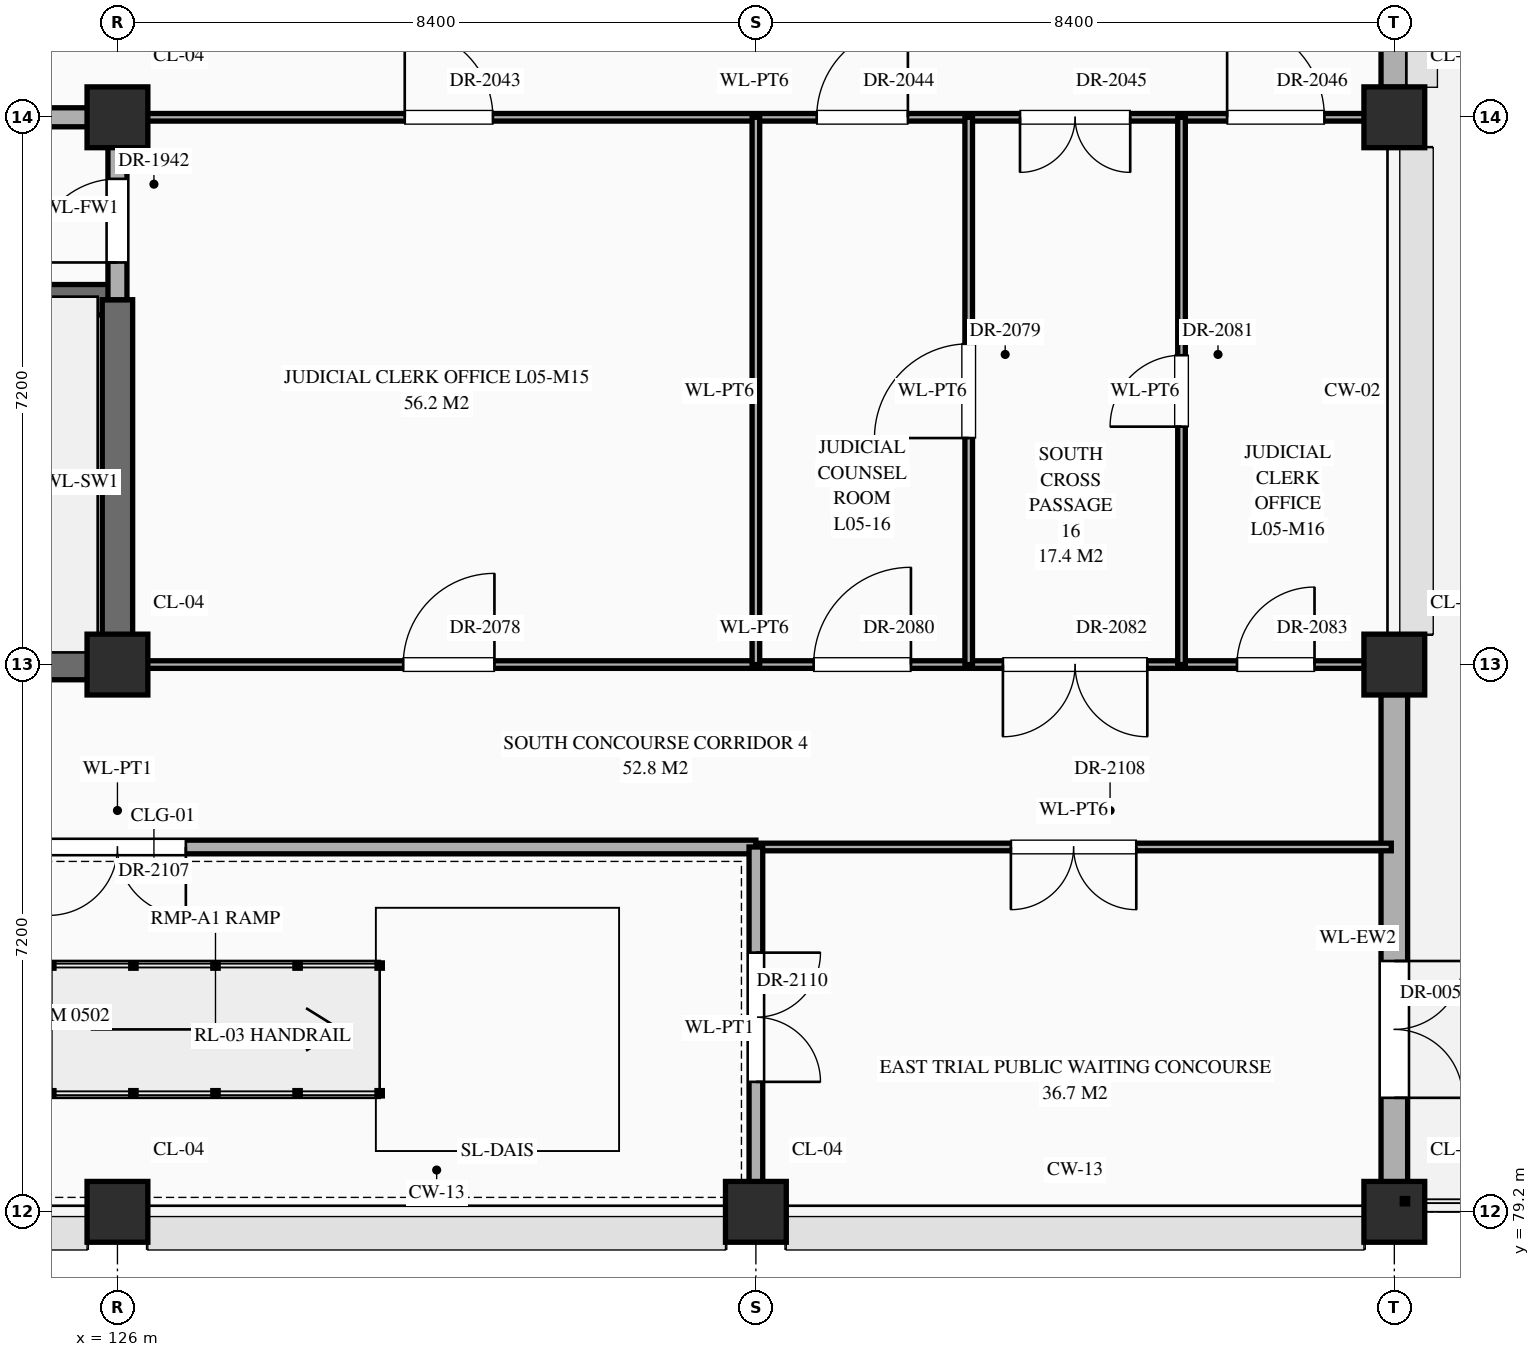
"""IFC4 building model, lengths in metres.
Left out: names, types, materials, properties, quantities, classifications, styles, units other than length and angle.
Written with IfcOpenShell. Run it as: python <this file> out.ifc"""

import sys

from ifc_helpers import new_model, si_unit, direction, frame, frame_2d, origin, origin_2d, place, context, subcontext, project, spatial, rectangle, extrude, element, fill, save


model = new_model("IFC4")
c1 = context("Model", 3, precision=1e-05, world=origin(), true_north=direction((0.0, 1.0)))
c2 = subcontext(c1, "Body", "Model", "MODEL_VIEW")
j1 = project(units=[si_unit("LENGTHUNIT", "METRE"), si_unit("PLANEANGLEUNIT", "RADIAN")], contexts=[c1])
p1 = place(None, origin())
s1 = spatial("IfcSite", under=j1, at=p1, CompositionType="ELEMENT")
p2 = place(p1, origin())
s2 = spatial("IfcBuilding", under=s1, at=p2, CompositionType="ELEMENT")
p3 = place(p2, frame((0.0, 0.0, 21.6)))
s3 = spatial("IfcBuildingStorey", under=s2, at=p3, CompositionType="ELEMENT", Elevation=21.6)
for number, where, z_axis, x_axis in (
    (1, (126.0, 79.2, 0.0), (0.0, 0.0, 1.0), (1.0, 0.0, 0.0)),
    (2, (126.0, 86.4, 0.0), (0.0, 0.0, 1.0), (1.0, 0.0, 0.0)),
    (3, (126.0, 93.6, 0.0), (0.0, 0.0, 1.0), (1.0, 0.0, 0.0)),
    (4, (134.4, 79.2, 0.0), (0.0, 0.0, 1.0), (1.0, 0.0, 0.0)),
    (5, (142.8, 79.2, 0.0), (0.0, 0.0, 1.0), (1.0, 0.0, 0.0)),
    (6, (142.8, 86.4, 0.0), (0.0, 0.0, 1.0), (1.0, 0.0, 0.0)),
    (7, (142.8, 93.6, 0.0), (0.0, 0.0, 1.0), (1.0, 0.0, 0.0)),
):
    element("IfcColumn", number, at=place(p3, frame(where, z_axis=z_axis, x_axis=x_axis)), inside=s3, PredefinedType="COLUMN", context=c2, shape_type="SweptSolid", body=[
        extrude(rectangle(XDim=0.8, YDim=0.8, at=origin_2d()), origin(), (0.0, 0.0, 1.0), 4.5),
    ])
p4 = place(p3, frame((142.8, 79.595, 0.0), z_axis=(0.0, 0.0, 1.0), x_axis=(0.0, 1.0, 0.0)))
e8 = element("IfcWall", 8, at=p4, inside=s3, PredefinedType="STANDARD", context=c2, shape_type="SweptSolid", body=[
    extrude(rectangle(XDim=6.41, YDim=0.35, at=frame_2d((3.205, 0.0))), origin(), (0.0, 0.0, 1.0), 3.59),
])
p5 = place(p4, frame((1.105, 0.0, 0.0)))
e9 = element("IfcOpeningElement", 9, at=p5, cuts=e8, PredefinedType="OPENING", context=c2, shape_type="SweptSolid", body=[
    extrude(rectangle(XDim=1.8, YDim=2.25, at=frame_2d((0.9, 1.125))), frame((0.0, 0.187, 0.0), z_axis=(0.0, -1.0, 0.0), x_axis=(1.0, 0.0, 0.0)), (0.0, 0.0, 1.0), 0.374),
])
p6 = place(p3, frame((142.8, 93.995, 0.0), z_axis=(0.0, 0.0, 1.0), x_axis=(0.0, 1.0, 0.0)))
e10 = element("IfcWall", 10, at=p6, inside=s3, PredefinedType="STANDARD", context=c2, shape_type="SweptSolid", body=[
    extrude(rectangle(XDim=6.41, YDim=0.35, at=frame_2d((3.205, 0.0))), origin(), (0.0, 0.0, 1.0), 3.59),
])
p7 = place(p6, frame((3.73, 0.0, 0.85)))
e11 = element("IfcOpeningElement", 11, at=p7, cuts=e10, PredefinedType="OPENING", context=c2, shape_type="SweptSolid", body=[
    extrude(rectangle(XDim=1.55, YDim=1.38, at=frame_2d((0.775, 0.69))), frame((0.0, 0.187, 0.0), z_axis=(0.0, -1.0, 0.0), x_axis=(1.0, 0.0, 0.0)), (0.0, 0.0, 1.0), 0.374),
])
p8 = place(p3, frame((117.6, 84.0, 0.0), z_axis=(0.0, 0.0, 1.0), x_axis=(1.0, 0.0, 0.0)))
e12 = element("IfcWall", 12, at=p8, inside=s3, PredefinedType="STANDARD", context=c2, shape_type="SweptSolid", body=[
    extrude(rectangle(XDim=16.8, YDim=0.18, at=frame_2d((8.4, 0.0))), origin(), (0.0, 0.0, 1.0), 4.24),
])
p9 = place(p8, frame((7.5, 0.0, 0.0)))
e13 = element("IfcOpeningElement", 13, at=p9, cuts=e12, PredefinedType="OPENING", context=c2, shape_type="SweptSolid", body=[
    extrude(rectangle(XDim=1.8, YDim=2.5, at=frame_2d((0.9, 1.25))), frame((0.0, 0.102, 0.0), z_axis=(0.0, -1.0, 0.0), x_axis=(1.0, 0.0, 0.0)), (0.0, 0.0, 1.0), 0.204),
])
p10 = place(p3, frame((134.4, 84.0, 0.0), z_axis=(0.0, 0.0, 1.0), x_axis=(1.0, 0.0, 0.0)))
e14 = element("IfcWall", 14, at=p10, inside=s3, PredefinedType="STANDARD", context=c2, shape_type="SweptSolid", body=[
    extrude(rectangle(XDim=8.36, YDim=0.1, at=frame_2d((4.18, 0.0))), origin(), (0.0, 0.0, 1.0), 4.24),
])
p11 = place(p10, frame((3.355, 0.0, 0.0)))
e15 = element("IfcOpeningElement", 15, at=p11, cuts=e14, PredefinedType="OPENING", context=c2, shape_type="SweptSolid", body=[
    extrude(rectangle(XDim=1.65, YDim=2.4, at=frame_2d((0.825, 1.2))), frame((0.0, 0.062, 0.0), z_axis=(0.0, -1.0, 0.0), x_axis=(1.0, 0.0, 0.0)), (0.0, 0.0, 1.0), 0.124),
])
p12 = place(p3, frame((117.6, 86.4, 0.0), z_axis=(0.0, 0.0, 1.0), x_axis=(1.0, 0.0, 0.0)))
e16 = element("IfcWall", 16, at=p12, inside=s3, PredefinedType="SHEAR", context=c2, shape_type="SweptSolid", body=[
    extrude(rectangle(XDim=8.4, YDim=0.4, at=frame_2d((4.2, 0.0))), origin(), (0.0, 0.0, 1.0), 4.24),
])
p13 = place(p3, frame((126.0, 86.4, 0.0), z_axis=(0.0, 0.0, 1.0), x_axis=(1.0, 0.0, 0.0)))
e17 = element("IfcWall", 17, at=p13, inside=s3, PredefinedType="STANDARD", context=c2, shape_type="SweptSolid", body=[
    extrude(rectangle(XDim=16.76, YDim=0.1, at=frame_2d((8.38, 0.0))), origin(), (0.0, 0.0, 1.0), 3.19),
])
p14 = place(p13, frame((3.76, 0.0, 0.0)))
e18 = element("IfcOpeningElement", 18, at=p14, cuts=e17, PredefinedType="OPENING", context=c2, shape_type="SweptSolid", body=[
    extrude(rectangle(XDim=1.2, YDim=2.35, at=frame_2d((0.6, 1.175))), frame((0.0, 0.062, 0.0), z_axis=(0.0, -1.0, 0.0), x_axis=(1.0, 0.0, 0.0)), (0.0, 0.0, 1.0), 0.124),
])
p15 = place(p13, frame((9.16, 0.0, 0.0)))
e19 = element("IfcOpeningElement", 19, at=p15, cuts=e17, PredefinedType="OPENING", context=c2, shape_type="SweptSolid", body=[
    extrude(rectangle(XDim=1.28, YDim=2.35, at=frame_2d((0.64, 1.175))), frame((0.0, 0.062, 0.0), z_axis=(0.0, -1.0, 0.0), x_axis=(1.0, 0.0, 0.0)), (0.0, 0.0, 1.0), 0.124),
])
p16 = place(p13, frame((11.65, 0.0, 0.0)))
e20 = element("IfcOpeningElement", 20, at=p16, cuts=e17, PredefinedType="OPENING", context=c2, shape_type="SweptSolid", body=[
    extrude(rectangle(XDim=1.9, YDim=2.5, at=frame_2d((0.95, 1.25))), frame((0.0, 0.062, 0.0), z_axis=(0.0, -1.0, 0.0), x_axis=(1.0, 0.0, 0.0)), (0.0, 0.0, 1.0), 0.124),
])
p17 = place(p13, frame((14.73, 0.0, 0.0)))
e21 = element("IfcOpeningElement", 21, at=p17, cuts=e17, PredefinedType="OPENING", context=c2, shape_type="SweptSolid", body=[
    extrude(rectangle(XDim=1.02, YDim=2.4, at=frame_2d((0.51, 1.2))), frame((0.0, 0.062, 0.0), z_axis=(0.0, -1.0, 0.0), x_axis=(1.0, 0.0, 0.0)), (0.0, 0.0, 1.0), 0.124),
])
p18 = place(p3, frame((117.6, 91.2, 0.0), z_axis=(0.0, 0.0, 1.0), x_axis=(1.0, 0.0, 0.0)))
e22 = element("IfcWall", 22, at=p18, inside=s3, PredefinedType="SHEAR", context=c2, shape_type="SweptSolid", body=[
    extrude(rectangle(XDim=8.4, YDim=0.4, at=frame_2d((4.2, 0.0))), origin(), (0.0, 0.0, 1.0), 4.24),
])
p19 = place(p18, frame((0.65, 0.0, 0.0)))
e23 = element("IfcOpeningElement", 23, at=p19, cuts=e22, PredefinedType="OPENING", context=c2, shape_type="SweptSolid", body=[
    extrude(rectangle(XDim=1.1, YDim=2.2, at=frame_2d((0.55, 1.1))), frame((0.0, 0.212, 0.0), z_axis=(0.0, -1.0, 0.0), x_axis=(1.0, 0.0, 0.0)), (0.0, 0.0, 1.0), 0.424),
])
p20 = place(p3, frame((117.6, 93.6, 0.0), z_axis=(0.0, 0.0, 1.0), x_axis=(1.0, 0.0, 0.0)))
e24 = element("IfcWall", 24, at=p20, inside=s3, PredefinedType="STANDARD", context=c2, shape_type="SweptSolid", body=[
    extrude(rectangle(XDim=8.4, YDim=0.25, at=frame_2d((4.2, 0.0))), origin(), (0.0, 0.0, 1.0), 3.39),
])
p21 = place(p20, frame((3.3, 0.0, 0.0)))
e25 = element("IfcOpeningElement", 25, at=p21, cuts=e24, PredefinedType="OPENING", context=c2, shape_type="SweptSolid", body=[
    extrude(rectangle(XDim=1.8, YDim=2.35, at=frame_2d((0.9, 1.175))), frame((0.0, 0.137, 0.0), z_axis=(0.0, -1.0, 0.0), x_axis=(1.0, 0.0, 0.0)), (0.0, 0.0, 1.0), 0.274),
])
p22 = place(p3, frame((126.0, 93.6, 0.0), z_axis=(0.0, 0.0, 1.0), x_axis=(1.0, 0.0, 0.0)))
e26 = element("IfcWall", 26, at=p22, inside=s3, PredefinedType="STANDARD", context=c2, shape_type="SweptSolid", body=[
    extrude(rectangle(XDim=16.76, YDim=0.1, at=frame_2d((8.38, 0.0))), origin(), (0.0, 0.0, 1.0), 3.19),
])
p23 = place(p22, frame((3.78, 0.0, 0.0)))
e27 = element("IfcOpeningElement", 27, at=p23, cuts=e26, PredefinedType="OPENING", context=c2, shape_type="SweptSolid", body=[
    extrude(rectangle(XDim=1.16, YDim=2.3, at=frame_2d((0.58, 1.15))), frame((0.0, 0.062, 0.0), z_axis=(0.0, -1.0, 0.0), x_axis=(1.0, 0.0, 0.0)), (0.0, 0.0, 1.0), 0.124),
])
p24 = place(p22, frame((9.2, 0.0, 0.0)))
e28 = element("IfcOpeningElement", 28, at=p24, cuts=e26, PredefinedType="OPENING", context=c2, shape_type="SweptSolid", body=[
    extrude(rectangle(XDim=1.2, YDim=2.35, at=frame_2d((0.6, 1.175))), frame((0.0, 0.062, 0.0), z_axis=(0.0, -1.0, 0.0), x_axis=(1.0, 0.0, 0.0)), (0.0, 0.0, 1.0), 0.124),
])
p25 = place(p22, frame((11.875, 0.0, 0.0)))
e29 = element("IfcOpeningElement", 29, at=p25, cuts=e26, PredefinedType="OPENING", context=c2, shape_type="SweptSolid", body=[
    extrude(rectangle(XDim=1.45, YDim=2.3, at=frame_2d((0.725, 1.15))), frame((0.0, 0.062, 0.0), z_axis=(0.0, -1.0, 0.0), x_axis=(1.0, 0.0, 0.0)), (0.0, 0.0, 1.0), 0.124),
])
p26 = place(p22, frame((14.6, 0.0, 0.0)))
e30 = element("IfcOpeningElement", 30, at=p26, cuts=e26, PredefinedType="OPENING", context=c2, shape_type="SweptSolid", body=[
    extrude(rectangle(XDim=1.28, YDim=2.35, at=frame_2d((0.64, 1.175))), frame((0.0, 0.062, 0.0), z_axis=(0.0, -1.0, 0.0), x_axis=(1.0, 0.0, 0.0)), (0.0, 0.0, 1.0), 0.124),
])
p27 = place(p3, frame((126.0, 86.4, 0.0), z_axis=(0.0, 0.0, 1.0), x_axis=(0.0, 1.0, 0.0)))
e31 = element("IfcWall", 31, at=p27, inside=s3, PredefinedType="SHEAR", context=c2, shape_type="SweptSolid", body=[
    extrude(rectangle(XDim=4.8, YDim=0.4, at=frame_2d((2.4, 0.0))), origin(), (0.0, 0.0, 1.0), 4.24),
])
p28 = place(p3, frame((126.0, 91.2, 0.0), z_axis=(0.0, 0.0, 1.0), x_axis=(0.0, 1.0, 0.0)))
e32 = element("IfcWall", 32, at=p28, inside=s3, PredefinedType="STANDARD", context=c2, shape_type="SweptSolid", body=[
    extrude(rectangle(XDim=2.4, YDim=0.25, at=frame_2d((1.2, 0.0))), origin(), (0.0, 0.0, 1.0), 3.49),
])
p29 = place(p28, frame((0.49, 0.0, 0.0)))
e33 = element("IfcOpeningElement", 33, at=p29, cuts=e32, PredefinedType="OPENING", context=c2, shape_type="SweptSolid", body=[
    extrude(rectangle(XDim=1.1, YDim=2.2, at=frame_2d((0.55, 1.1))), frame((0.0, 0.137, 0.0), z_axis=(0.0, -1.0, 0.0), x_axis=(1.0, 0.0, 0.0)), (0.0, 0.0, 1.0), 0.274),
])
p30 = place(p3, frame((134.4, 79.24, 0.0), z_axis=(0.0, 0.0, 1.0), x_axis=(0.0, 1.0, 0.0)))
e34 = element("IfcWall", 34, at=p30, inside=s3, PredefinedType="STANDARD", context=c2, shape_type="SweptSolid", body=[
    extrude(rectangle(XDim=4.76, YDim=0.18, at=frame_2d((2.38, 0.0))), origin(), (0.0, 0.0, 1.0), 4.24),
])
p31 = place(p30, frame((1.67, 0.0, 0.0)))
e35 = element("IfcOpeningElement", 35, at=p31, cuts=e34, PredefinedType="OPENING", context=c2, shape_type="SweptSolid", body=[
    extrude(rectangle(XDim=1.7, YDim=2.45, at=frame_2d((0.85, 1.225))), frame((0.0, 0.102, 0.0), z_axis=(0.0, -1.0, 0.0), x_axis=(1.0, 0.0, 0.0)), (0.0, 0.0, 1.0), 0.204),
])
p32 = place(p3, frame((134.4, 86.4, 0.0), z_axis=(0.0, 0.0, 1.0), x_axis=(0.0, 1.0, 0.0)))
e36 = element("IfcWall", 36, at=p32, inside=s3, PredefinedType="STANDARD", context=c2, shape_type="SweptSolid", body=[
    extrude(rectangle(XDim=7.2, YDim=0.1, at=frame_2d((3.6, 0.0))), origin(), (0.0, 0.0, 1.0), 4.24),
])
p33 = place(p3, frame((137.2, 86.4, 0.0), z_axis=(0.0, 0.0, 1.0), x_axis=(0.0, 1.0, 0.0)))
e37 = element("IfcWall", 37, at=p33, inside=s3, PredefinedType="STANDARD", context=c2, shape_type="SweptSolid", body=[
    extrude(rectangle(XDim=7.2, YDim=0.1, at=frame_2d((3.6, 0.0))), origin(), (0.0, 0.0, 1.0), 4.24),
])
p34 = place(p33, frame((2.98, 0.0, 0.0)))
e38 = element("IfcOpeningElement", 38, at=p34, cuts=e37, PredefinedType="OPENING", context=c2, shape_type="SweptSolid", body=[
    extrude(rectangle(XDim=1.24, YDim=2.3, at=frame_2d((0.62, 1.15))), frame((0.0, 0.062, 0.0), z_axis=(0.0, -1.0, 0.0), x_axis=(1.0, 0.0, 0.0)), (0.0, 0.0, 1.0), 0.124),
])
p35 = place(p3, frame((140.0, 86.4, 0.0), z_axis=(0.0, 0.0, 1.0), x_axis=(0.0, 1.0, 0.0)))
e39 = element("IfcWall", 39, at=p35, inside=s3, PredefinedType="STANDARD", context=c2, shape_type="SweptSolid", body=[
    extrude(rectangle(XDim=7.2, YDim=0.1, at=frame_2d((3.6, 0.0))), origin(), (0.0, 0.0, 1.0), 4.24),
])
p36 = place(p35, frame((3.13, 0.0, 0.0)))
e40 = element("IfcOpeningElement", 40, at=p36, cuts=e39, PredefinedType="OPENING", context=c2, shape_type="SweptSolid", body=[
    extrude(rectangle(XDim=0.94, YDim=2.3, at=frame_2d((0.47, 1.15))), frame((0.0, 0.062, 0.0), z_axis=(0.0, -1.0, 0.0), x_axis=(1.0, 0.0, 0.0)), (0.0, 0.0, 1.0), 0.124),
])
p37 = place(p5, frame((1.8, 0.0, 0.0), z_axis=(0.0, 0.0, 1.0), x_axis=(-1.0, 0.0, 0.0)))
e41 = element("IfcDoor", 41, at=p37, inside=s3, OperationType="DOUBLE_DOOR_SINGLE_SWING", PredefinedType="DOOR", context=c2, shape_type="SweptSolid", body=[
    extrude(rectangle(XDim=1.8, YDim=2.25, at=frame_2d((0.9, 1.125))), frame((0.0, 0.025, 0.0), z_axis=(0.0, -1.0, 0.0), x_axis=(1.0, 0.0, 0.0)), (0.0, 0.0, 1.0), 0.05),
])
fill(e9, e41)
p38 = place(p29, origin())
e42 = element("IfcDoor", 42, at=p38, inside=s3, OperationType="SINGLE_SWING_LEFT", PredefinedType="DOOR", context=c2, shape_type="SweptSolid", body=[
    extrude(rectangle(XDim=1.1, YDim=2.2, at=frame_2d((0.55, 1.1))), frame((0.0, 0.025, 0.0), z_axis=(0.0, -1.0, 0.0), x_axis=(1.0, 0.0, 0.0)), (0.0, 0.0, 1.0), 0.05),
])
fill(e33, e42)
p39 = place(p23, origin())
e43 = element("IfcDoor", 43, at=p39, inside=s3, OperationType="SINGLE_SWING_LEFT", PredefinedType="DOOR", context=c2, shape_type="SweptSolid", body=[
    extrude(rectangle(XDim=1.16, YDim=2.3, at=frame_2d((0.58, 1.15))), frame((0.0, 0.025, 0.0), z_axis=(0.0, -1.0, 0.0), x_axis=(1.0, 0.0, 0.0)), (0.0, 0.0, 1.0), 0.05),
])
fill(e27, e43)
p40 = place(p24, origin())
e44 = element("IfcDoor", 44, at=p40, inside=s3, OperationType="SINGLE_SWING_RIGHT", PredefinedType="DOOR", context=c2, shape_type="SweptSolid", body=[
    extrude(rectangle(XDim=1.2, YDim=2.35, at=frame_2d((0.6, 1.175))), frame((0.0, 0.025, 0.0), z_axis=(0.0, -1.0, 0.0), x_axis=(1.0, 0.0, 0.0)), (0.0, 0.0, 1.0), 0.05),
])
fill(e28, e44)
p41 = place(p25, frame((1.45, 0.0, 0.0), z_axis=(0.0, 0.0, 1.0), x_axis=(-1.0, 0.0, 0.0)))
e45 = element("IfcDoor", 45, at=p41, inside=s3, OperationType="DOUBLE_DOOR_SINGLE_SWING", PredefinedType="DOOR", context=c2, shape_type="SweptSolid", body=[
    extrude(rectangle(XDim=1.45, YDim=2.3, at=frame_2d((0.725, 1.15))), frame((0.0, 0.025, 0.0), z_axis=(0.0, -1.0, 0.0), x_axis=(1.0, 0.0, 0.0)), (0.0, 0.0, 1.0), 0.05),
])
fill(e29, e45)
p42 = place(p26, origin())
e46 = element("IfcDoor", 46, at=p42, inside=s3, OperationType="SINGLE_SWING_LEFT", PredefinedType="DOOR", context=c2, shape_type="SweptSolid", body=[
    extrude(rectangle(XDim=1.28, YDim=2.35, at=frame_2d((0.64, 1.175))), frame((0.0, 0.025, 0.0), z_axis=(0.0, -1.0, 0.0), x_axis=(1.0, 0.0, 0.0)), (0.0, 0.0, 1.0), 0.05),
])
fill(e30, e46)
p43 = place(p14, origin())
e47 = element("IfcDoor", 47, at=p43, inside=s3, OperationType="SINGLE_SWING_RIGHT", PredefinedType="DOOR", context=c2, shape_type="SweptSolid", body=[
    extrude(rectangle(XDim=1.2, YDim=2.35, at=frame_2d((0.6, 1.175))), frame((0.0, 0.025, 0.0), z_axis=(0.0, -1.0, 0.0), x_axis=(1.0, 0.0, 0.0)), (0.0, 0.0, 1.0), 0.05),
])
fill(e18, e47)
p44 = place(p34, origin())
e48 = element("IfcDoor", 48, at=p44, inside=s3, OperationType="SINGLE_SWING_LEFT", PredefinedType="DOOR", context=c2, shape_type="SweptSolid", body=[
    extrude(rectangle(XDim=1.24, YDim=2.3, at=frame_2d((0.62, 1.15))), frame((0.0, 0.025, 0.0), z_axis=(0.0, -1.0, 0.0), x_axis=(1.0, 0.0, 0.0)), (0.0, 0.0, 1.0), 0.05),
])
fill(e38, e48)
p45 = place(p15, origin())
e49 = element("IfcDoor", 49, at=p45, inside=s3, OperationType="SINGLE_SWING_RIGHT", PredefinedType="DOOR", context=c2, shape_type="SweptSolid", body=[
    extrude(rectangle(XDim=1.28, YDim=2.35, at=frame_2d((0.64, 1.175))), frame((0.0, 0.025, 0.0), z_axis=(0.0, -1.0, 0.0), x_axis=(1.0, 0.0, 0.0)), (0.0, 0.0, 1.0), 0.05),
])
fill(e19, e49)
p46 = place(p36, origin())
e50 = element("IfcDoor", 50, at=p46, inside=s3, OperationType="SINGLE_SWING_LEFT", PredefinedType="DOOR", context=c2, shape_type="SweptSolid", body=[
    extrude(rectangle(XDim=0.94, YDim=2.3, at=frame_2d((0.47, 1.15))), frame((0.0, 0.025, 0.0), z_axis=(0.0, -1.0, 0.0), x_axis=(1.0, 0.0, 0.0)), (0.0, 0.0, 1.0), 0.05),
])
fill(e40, e50)
p47 = place(p16, frame((1.9, 0.0, 0.0), z_axis=(0.0, 0.0, 1.0), x_axis=(-1.0, 0.0, 0.0)))
e51 = element("IfcDoor", 51, at=p47, inside=s3, OperationType="DOUBLE_DOOR_SINGLE_SWING", PredefinedType="DOOR", context=c2, shape_type="SweptSolid", body=[
    extrude(rectangle(XDim=1.9, YDim=2.5, at=frame_2d((0.95, 1.25))), frame((0.0, 0.025, 0.0), z_axis=(0.0, -1.0, 0.0), x_axis=(1.0, 0.0, 0.0)), (0.0, 0.0, 1.0), 0.05),
])
fill(e20, e51)
p48 = place(p17, origin())
e52 = element("IfcDoor", 52, at=p48, inside=s3, OperationType="SINGLE_SWING_RIGHT", PredefinedType="DOOR", context=c2, shape_type="SweptSolid", body=[
    extrude(rectangle(XDim=1.02, YDim=2.4, at=frame_2d((0.51, 1.2))), frame((0.0, 0.025, 0.0), z_axis=(0.0, -1.0, 0.0), x_axis=(1.0, 0.0, 0.0)), (0.0, 0.0, 1.0), 0.05),
])
fill(e21, e52)
p49 = place(p9, frame((1.8, 0.0, 0.0), z_axis=(0.0, 0.0, 1.0), x_axis=(-1.0, 0.0, 0.0)))
e53 = element("IfcDoor", 53, at=p49, inside=s3, OperationType="DOUBLE_DOOR_SINGLE_SWING", PredefinedType="DOOR", context=c2, shape_type="SweptSolid", body=[
    extrude(rectangle(XDim=1.8, YDim=2.5, at=frame_2d((0.9, 1.25))), frame((0.0, 0.025, 0.0), z_axis=(0.0, -1.0, 0.0), x_axis=(1.0, 0.0, 0.0)), (0.0, 0.0, 1.0), 0.05),
])
fill(e13, e53)
p50 = place(p11, frame((1.65, 0.0, 0.0), z_axis=(0.0, 0.0, 1.0), x_axis=(-1.0, 0.0, 0.0)))
e54 = element("IfcDoor", 54, at=p50, inside=s3, OperationType="DOUBLE_DOOR_SINGLE_SWING", PredefinedType="DOOR", context=c2, shape_type="SweptSolid", body=[
    extrude(rectangle(XDim=1.65, YDim=2.4, at=frame_2d((0.825, 1.2))), frame((0.0, 0.025, 0.0), z_axis=(0.0, -1.0, 0.0), x_axis=(1.0, 0.0, 0.0)), (0.0, 0.0, 1.0), 0.05),
])
fill(e15, e54)
p51 = place(p31, frame((1.7, 0.0, 0.0), z_axis=(0.0, 0.0, 1.0), x_axis=(-1.0, 0.0, 0.0)))
e55 = element("IfcDoor", 55, at=p51, inside=s3, OperationType="DOUBLE_DOOR_SINGLE_SWING", PredefinedType="DOOR", context=c2, shape_type="SweptSolid", body=[
    extrude(rectangle(XDim=1.7, YDim=2.45, at=frame_2d((0.85, 1.225))), frame((0.0, 0.025, 0.0), z_axis=(0.0, -1.0, 0.0), x_axis=(1.0, 0.0, 0.0)), (0.0, 0.0, 1.0), 0.05),
])
fill(e35, e55)
save(model, sys.argv[1])
